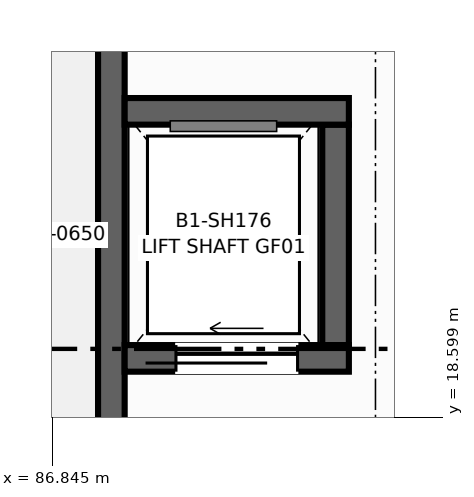
"""IFC4 building model, lengths in metres.
Left out: names, types, materials, properties, quantities, classifications, styles, units other than length and angle.
Written with IfcOpenShell. Run it as: python <this file> out.ifc"""

import sys

from ifc_helpers import new_model, si_unit, direction, frame, frame_2d, origin, place, context, subcontext, project, spatial, rectangle, extrude, element, fill, save


model = new_model("IFC4")
c1 = context("Model", 3, precision=1e-05, world=origin(), true_north=direction((0.0, 1.0)))
c2 = subcontext(c1, "Body", "Model", "MODEL_VIEW")
j1 = project(units=[si_unit("LENGTHUNIT", "METRE"), si_unit("PLANEANGLEUNIT", "RADIAN")], contexts=[c1])
p1 = place(None, origin())
s1 = spatial("IfcSite", under=j1, at=p1, CompositionType="ELEMENT")
p2 = place(p1, origin())
s2 = spatial("IfcBuilding", under=s1, at=p2, CompositionType="ELEMENT")
p3 = place(p2, frame((0.0, 0.0, -4.5)))
s3 = spatial("IfcBuildingStorey", under=s2, at=p3, CompositionType="ELEMENT", Elevation=-4.5)
p4 = place(p3, frame((87.625, 18.5, 0.0), z_axis=(0.0, 0.0, 1.0), x_axis=(0.0, 1.0, 0.0)))
e1 = element("IfcWall", 1, at=p4, inside=s3, PredefinedType="SHEAR", context=c2, shape_type="SweptSolid", body=[
    extrude(rectangle(XDim=5.0, YDim=0.35, at=frame_2d((2.5, 0.0))), origin(), (0.0, 0.0, 1.0), 4.2),
])
p5 = place(p3, frame((90.575, 19.55, 0.0), z_axis=(0.0, 0.0, 1.0), x_axis=(0.0, 1.0, 0.0)))
e2 = element("IfcWall", 2, at=p5, inside=s3, PredefinedType="SHEAR", context=c2, shape_type="SweptSolid", body=[
    extrude(rectangle(XDim=2.9, YDim=0.35, at=frame_2d((1.45, 0.0))), origin(), (0.0, 0.0, 1.0), 4.2),
])
p6 = place(p3, frame((87.8, 19.375, 0.0), z_axis=(0.0, 0.0, 1.0), x_axis=(1.0, 0.0, 0.0)))
e3 = element("IfcWall", 3, at=p6, inside=s3, PredefinedType="SHEAR", context=c2, shape_type="SweptSolid", body=[
    extrude(rectangle(XDim=2.95, YDim=0.35, at=frame_2d((1.475, 0.0))), origin(), (0.0, 0.0, 1.0), 4.2),
])
p7 = place(p6, frame((0.675, 0.0, 0.0)))
e4 = element("IfcOpeningElement", 4, at=p7, cuts=e3, PredefinedType="OPENING", context=c2, shape_type="SweptSolid", body=[
    extrude(rectangle(XDim=1.6, YDim=2.35, at=frame_2d((0.8, 1.175))), frame((0.0, 0.185, 0.0), z_axis=(0.0, -1.0, 0.0), x_axis=(1.0, 0.0, 0.0)), (0.0, 0.0, 1.0), 0.37),
])
p8 = place(p3, frame((87.8, 22.625, 0.0), z_axis=(0.0, 0.0, 1.0), x_axis=(1.0, 0.0, 0.0)))
e5 = element("IfcWall", 5, at=p8, inside=s3, PredefinedType="SHEAR", context=c2, shape_type="SweptSolid", body=[
    extrude(rectangle(XDim=2.95, YDim=0.35, at=frame_2d((1.475, 0.0))), origin(), (0.0, 0.0, 1.0), 4.2),
])
p9 = place(p7, origin())
e6 = element("IfcDoor", 6, at=p9, inside=s3, OperationType="SLIDING_TO_LEFT", PredefinedType="DOOR", context=c2, shape_type="SweptSolid", body=[
    extrude(rectangle(XDim=1.6, YDim=2.35, at=frame_2d((0.8, 1.175))), frame((0.0, 0.025, 0.0), z_axis=(0.0, -1.0, 0.0), x_axis=(1.0, 0.0, 0.0)), (0.0, 0.0, 1.0), 0.05),
])
fill(e4, e6)
save(model, sys.argv[1])
